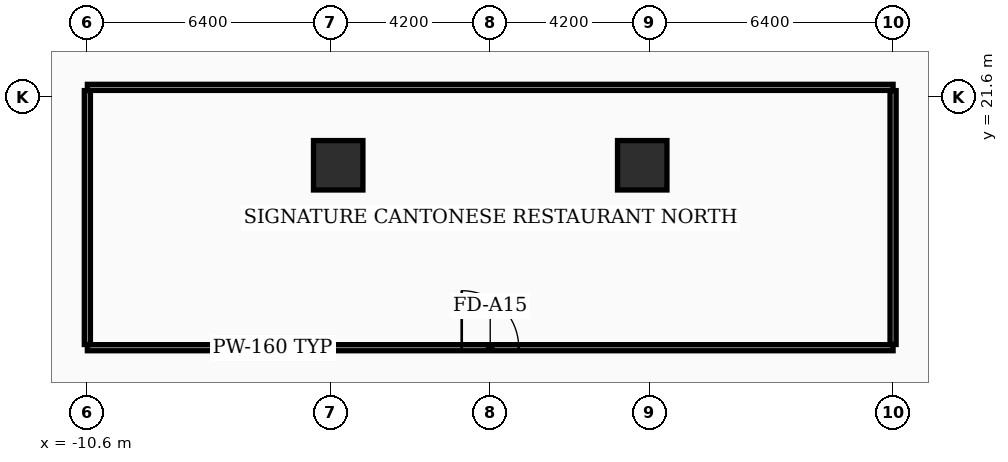
"""IFC4 building model, lengths in metres.
Left out: names, types, materials, properties, quantities, classifications, styles, units other than length and angle.
Written with IfcOpenShell. Run it as: python <this file> out.ifc"""

import sys

from ifc_helpers import new_model, si_unit, direction, frame, frame_2d, origin, origin_2d, place, context, subcontext, project, spatial, rectangle, extrude, element, fill, save


model = new_model("IFC4")
c1 = context("Model", 3, precision=1e-05, world=origin(), true_north=direction((0.0, 1.0)))
c2 = subcontext(c1, "Body", "Model", "MODEL_VIEW")
j1 = project(units=[si_unit("LENGTHUNIT", "METRE"), si_unit("PLANEANGLEUNIT", "RADIAN")], contexts=[c1])
p1 = place(None, origin())
s1 = spatial("IfcSite", under=j1, at=p1, CompositionType="ELEMENT")
p2 = place(p1, origin())
s2 = spatial("IfcBuilding", under=s1, at=p2, CompositionType="ELEMENT")
p3 = place(p2, frame((0.0, 0.0, 14.7)))
s3 = spatial("IfcBuildingStorey", under=s2, at=p3, CompositionType="ELEMENT", Elevation=14.7)
for number, where, z_axis, x_axis in (
    (1, (-4.0, 19.8, 0.0), (0.0, 0.0, 1.0), (1.0, 0.0, 0.0)),
    (2, (4.0, 19.8, 0.0), (0.0, 0.0, 1.0), (1.0, 0.0, 0.0)),
):
    element("IfcColumn", number, at=place(p3, frame(where, z_axis=z_axis, x_axis=x_axis)), inside=s3, PredefinedType="COLUMN", context=c2, shape_type="SweptSolid", body=[
        extrude(rectangle(XDim=1.3, YDim=1.3, at=origin_2d()), origin(), (0.0, 0.0, 1.0), 4.5),
    ])
p4 = place(p3, frame((-10.6, 15.0, 0.0), z_axis=(0.0, 0.0, 1.0), x_axis=(1.0, 0.0, 0.0)))
e3 = element("IfcWall", 3, at=p4, inside=s3, PredefinedType="PARTITIONING", context=c2, shape_type="SweptSolid", body=[
    extrude(rectangle(XDim=21.2, YDim=0.16, at=frame_2d((10.6, 0.0))), origin(), (0.0, 0.0, 1.0), 3.32),
])
p5 = place(p4, frame((9.85, 0.0, 0.0)))
e4 = element("IfcOpeningElement", 4, at=p5, cuts=e3, PredefinedType="OPENING", context=c2, shape_type="SweptSolid", body=[
    extrude(rectangle(XDim=1.5, YDim=2.15, at=frame_2d((0.75, 1.075))), frame((0.0, 0.09, 0.0), z_axis=(0.0, -1.0, 0.0), x_axis=(1.0, 0.0, 0.0)), (0.0, 0.0, 1.0), 0.18),
])
p6 = place(p3, frame((-10.6, 21.85, 0.0), z_axis=(0.0, 0.0, 1.0), x_axis=(1.0, 0.0, 0.0)))
e5 = element("IfcWall", 5, at=p6, inside=s3, PredefinedType="PARTITIONING", context=c2, shape_type="SweptSolid", body=[
    extrude(rectangle(XDim=21.2, YDim=0.16, at=frame_2d((10.6, 0.0))), origin(), (0.0, 0.0, 1.0), 3.32),
])
for number, where, z_axis, x_axis in (
    (6, (-10.6, 15.085, 0.0), (0.0, 0.0, 1.0), (0.0, 1.0, 0.0)),
    (7, (10.6, 15.085, 0.0), (0.0, 0.0, 1.0), (0.0, 1.0, 0.0)),
):
    element("IfcWall", number, at=place(p3, frame(where, z_axis=z_axis, x_axis=x_axis)), inside=s3, PredefinedType="PARTITIONING", context=c2, shape_type="SweptSolid", body=[
        extrude(rectangle(XDim=6.68, YDim=0.16, at=frame_2d((3.34, 0.0))), origin(), (0.0, 0.0, 1.0), 3.32),
    ])
p7 = place(p5, origin())
e8 = element("IfcDoor", 8, at=p7, inside=s3, OperationType="DOUBLE_DOOR_SINGLE_SWING", PredefinedType="DOOR", context=c2, shape_type="SweptSolid", body=[
    extrude(rectangle(XDim=1.5, YDim=2.15, at=frame_2d((0.75, 1.075))), frame((0.0, 0.025, 0.0), z_axis=(0.0, -1.0, 0.0), x_axis=(1.0, 0.0, 0.0)), (0.0, 0.0, 1.0), 0.05),
])
fill(e4, e8)
save(model, sys.argv[1])
